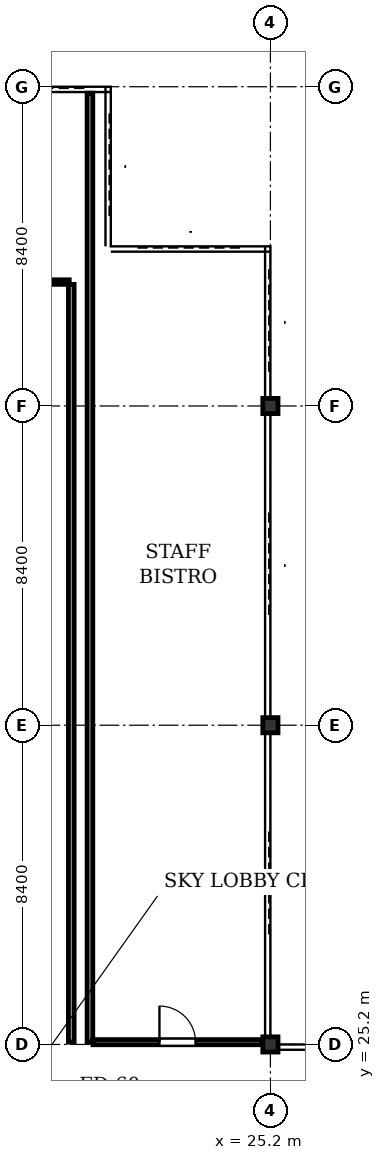
"""IFC4 building model, lengths in metres.
Left out: names, types, materials, properties, quantities, classifications, styles, units other than length and angle.
Written with IfcOpenShell. Run it as: python <this file> out.ifc"""

import sys

from ifc_helpers import new_model, si_unit, direction, frame, frame_2d, origin, origin_2d, place, context, subcontext, project, spatial, rectangle, i_section, extrude, element, fill, save


model = new_model("IFC4")
c1 = context("Model", 3, precision=1e-05, world=origin(), true_north=direction((0.0, 1.0)))
c2 = subcontext(c1, "Body", "Model", "MODEL_VIEW")
j1 = project(units=[si_unit("LENGTHUNIT", "METRE"), si_unit("PLANEANGLEUNIT", "RADIAN")], contexts=[c1])
p1 = place(None, origin())
s1 = spatial("IfcSite", under=j1, at=p1, CompositionType="ELEMENT")
p2 = place(p1, origin())
s2 = spatial("IfcBuilding", under=s1, at=p2, CompositionType="ELEMENT")
p3 = place(p2, frame((0.0, 0.0, 113.1)))
s3 = spatial("IfcBuildingStorey", under=s2, at=p3, CompositionType="ELEMENT", Elevation=113.1)
for number, where, z_axis, x_axis in (
    (1, (25.2, 25.2, 0.0), (0.0, 0.0, 1.0), (1.0, 0.0, 0.0)),
    (2, (25.2, 33.6, 0.0), (0.0, 0.0, 1.0), (1.0, 0.0, 0.0)),
    (3, (25.2, 42.0, 0.0), (0.0, 0.0, 1.0), (1.0, 0.0, 0.0)),
):
    element("IfcColumn", number, at=place(p3, frame(where, z_axis=z_axis, x_axis=x_axis)), inside=s3, PredefinedType="COLUMN", context=c2, shape_type="SweptSolid", body=[
        extrude(i_section(OverallWidth=0.4, OverallDepth=0.4, WebThickness=0.025, FlangeThickness=0.04, at=origin_2d()), origin(), (0.0, 0.0, 1.0), 4.1),
    ])
p4 = place(p3, frame((20.451, 50.231, 0.0), z_axis=(0.0, 0.0, 1.0), x_axis=(0.0, -1.0, 0.0)))
e4 = element("IfcWall", 4, at=p4, inside=s3, PredefinedType="PARTITIONING", context=c2, shape_type="SweptSolid", body=[
    extrude(rectangle(XDim=24.971, YDim=0.15, at=frame_2d((12.485, 0.0))), origin(), (0.0, 0.0, 1.0), 3.292),
])
p5 = place(p3, frame((20.53, 25.26, 0.0), z_axis=(0.0, 0.0, 1.0), x_axis=(1.0, 0.0, 0.0)))
e5 = element("IfcWall", 5, at=p5, inside=s3, PredefinedType="PARTITIONING", context=c2, shape_type="SweptSolid", body=[
    extrude(rectangle(XDim=4.45, YDim=0.135, at=frame_2d((2.225, 0.0))), origin(), (0.0, 0.0, 1.0), 3.292),
])
p6 = place(p5, frame((1.75, 0.0, 0.0)))
e6 = element("IfcOpeningElement", 6, at=p6, cuts=e5, PredefinedType="OPENING", context=c2, shape_type="SweptSolid", body=[
    extrude(rectangle(XDim=0.95, YDim=2.15, at=frame_2d((0.475, 1.075))), frame((0.0, 0.077, 0.0), z_axis=(0.0, -1.0, 0.0), x_axis=(1.0, 0.0, 0.0)), (0.0, 0.0, 1.0), 0.155),
])
p7 = place(p3, frame((19.96, 45.2, 0.0), z_axis=(0.0, 0.0, 1.0), x_axis=(0.0, -1.0, 0.0)))
e7 = element("IfcWall", 7, at=p7, inside=s3, PredefinedType="PARTITIONING", context=c2, shape_type="SweptSolid", body=[
    extrude(rectangle(XDim=19.94, YDim=0.15, at=frame_2d((9.97, 0.0))), origin(), (0.0, 0.0, 1.0), 3.292),
])
p8 = place(p3, frame((17.6, 45.26, 0.0), z_axis=(0.0, 0.0, 1.0), x_axis=(0.999999994395, -0.000105876124, 0.0)))
e8 = element("IfcWall", 8, at=p8, inside=s3, PredefinedType="PARTITIONING", context=c2, shape_type="SweptSolid", body=[
    extrude(rectangle(XDim=2.306, YDim=0.12, at=frame_2d((1.153, 0.0))), origin(), (0.0, 0.0, 1.0), 3.825),
])
p9 = place(p6, origin())
e9 = element("IfcDoor", 9, at=p9, inside=s3, OperationType="SINGLE_SWING_LEFT", PredefinedType="DOOR", context=c2, shape_type="SweptSolid", body=[
    extrude(rectangle(XDim=0.95, YDim=2.15, at=frame_2d((0.475, 1.075))), frame((0.0, 0.025, 0.0), z_axis=(0.0, -1.0, 0.0), x_axis=(1.0, 0.0, 0.0)), (0.0, 0.0, 1.0), 0.05),
])
fill(e6, e9)
save(model, sys.argv[1])
